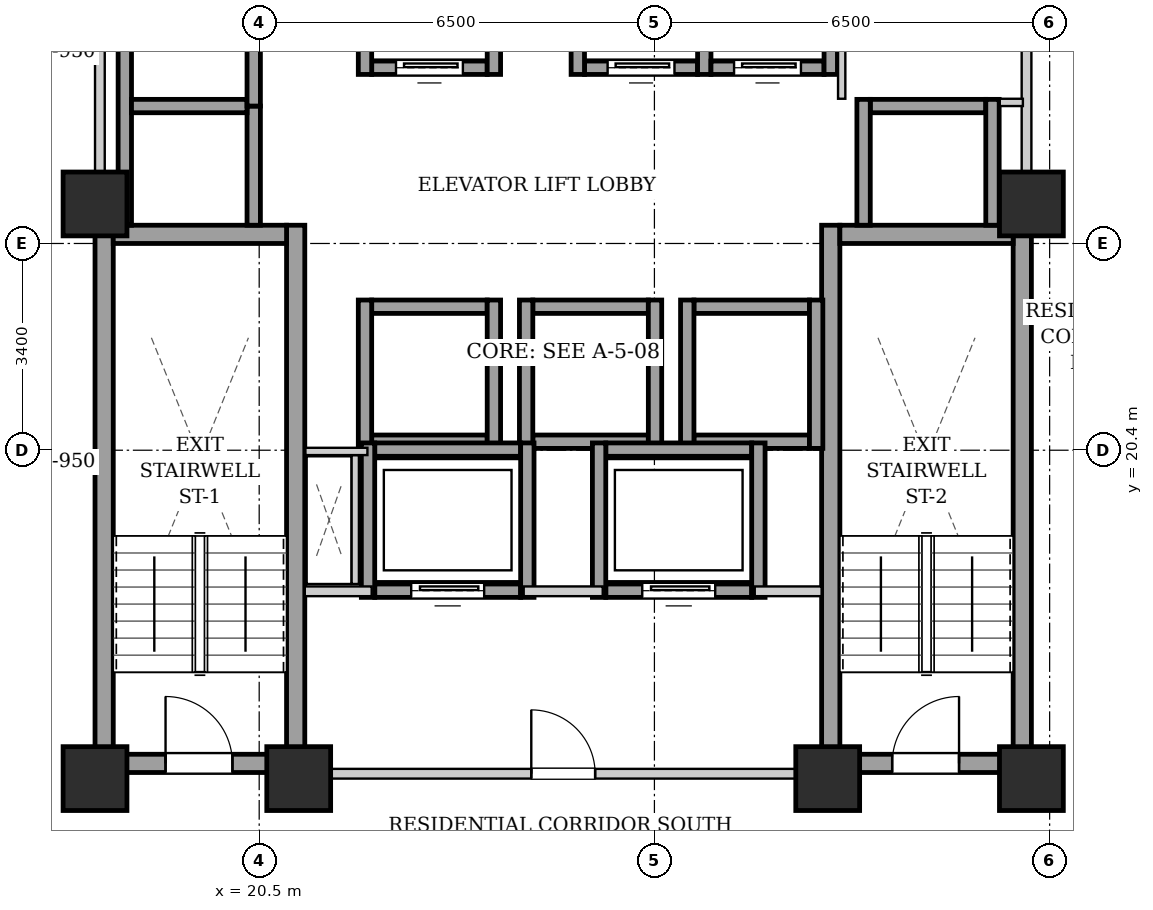
"""IFC4 building model, lengths in metres.
Left out: names, types, materials, properties, quantities, classifications, styles, units other than length and angle.
Written with IfcOpenShell. Run it as: python <this file> out.ifc"""

import sys

from ifc_helpers import new_model, si_unit, direction, frame, frame_2d, origin, origin_2d, place, context, subcontext, project, spatial, rectangle, extrude, element, fill, save


model = new_model("IFC4")
c1 = context("Model", 3, precision=1e-05, world=origin(), true_north=direction((0.0, 1.0)))
c2 = subcontext(c1, "Body", "Model", "MODEL_VIEW")
j1 = project(units=[si_unit("LENGTHUNIT", "METRE"), si_unit("PLANEANGLEUNIT", "RADIAN")], contexts=[c1])
p1 = place(None, origin())
s1 = spatial("IfcSite", under=j1, at=p1, CompositionType="ELEMENT")
p2 = place(p1, origin())
s2 = spatial("IfcBuilding", under=s1, at=p2, CompositionType="ELEMENT")
p3 = place(p2, frame((0.0, 0.0, 100.7)))
s3 = spatial("IfcBuildingStorey", under=s2, at=p3, CompositionType="ELEMENT", Elevation=100.7)
for number, where, z_axis, x_axis in (
    (1, (17.8, 15.0, 0.0), (0.0, 0.0, 1.0), (1.0, 0.0, 0.0)),
    (2, (21.15, 15.0, 0.0), (0.0, 0.0, 1.0), (1.0, 0.0, 0.0)),
    (3, (29.85, 15.0, 0.0), (0.0, 0.0, 1.0), (1.0, 0.0, 0.0)),
    (4, (33.2, 15.0, 0.0), (0.0, 0.0, 1.0), (1.0, 0.0, 0.0)),
    (5, (17.8, 24.45, 0.0), (0.0, 0.0, 1.0), (1.0, 0.0, 0.0)),
    (6, (33.2, 24.45, 0.0), (0.0, 0.0, 1.0), (1.0, 0.0, 0.0)),
):
    element("IfcColumn", number, at=place(p3, frame(where, z_axis=z_axis, x_axis=x_axis)), inside=s3, PredefinedType="COLUMN", context=c2, shape_type="SweptSolid", body=[
        extrude(rectangle(XDim=1.05, YDim=1.05, at=origin_2d()), origin(), (0.0, 0.0, 1.0), 3.2),
    ])
for number, where, z_axis, x_axis in (
    (7, (17.95, 15.1, 0.0), (0.0, 0.0, 1.0), (0.0, 1.0, 0.0)),
    (8, (21.1, 15.1, 0.0), (0.0, 0.0, 1.0), (0.0, 1.0, 0.0)),
):
    element("IfcWall", number, at=place(p3, frame(where, z_axis=z_axis, x_axis=x_axis)), inside=s3, PredefinedType="SHEAR", context=c2, shape_type="SweptSolid", body=[
        extrude(rectangle(XDim=9.0, YDim=0.3, at=frame_2d((4.5, 0.0))), origin(), (0.0, 0.0, 1.0), 2.94),
    ])
p4 = place(p3, frame((18.1, 23.95, 0.0), z_axis=(0.0, 0.0, 1.0), x_axis=(1.0, 0.0, 0.0)))
e9 = element("IfcWall", 9, at=p4, inside=s3, PredefinedType="SHEAR", context=c2, shape_type="SweptSolid", body=[
    extrude(rectangle(XDim=2.85, YDim=0.3, at=frame_2d((1.425, 0.0))), origin(), (0.0, 0.0, 1.0), 2.94),
])
p5 = place(p3, frame((18.1, 15.25, 0.0), z_axis=(0.0, 0.0, 1.0), x_axis=(1.0, 0.0, 0.0)))
e10 = element("IfcWall", 10, at=p5, inside=s3, PredefinedType="SHEAR", context=c2, shape_type="SweptSolid", body=[
    extrude(rectangle(XDim=2.85, YDim=0.3, at=frame_2d((1.425, 0.0))), origin(), (0.0, 0.0, 1.0), 2.94),
])
p6 = place(p5, frame((0.86, 0.0, 0.0)))
e11 = element("IfcOpeningElement", 11, at=p6, cuts=e10, PredefinedType="OPENING", context=c2, shape_type="SweptSolid", body=[
    extrude(rectangle(XDim=1.1, YDim=2.05, at=frame_2d((0.55, 1.025))), frame((0.0, 0.16, 0.0), z_axis=(0.0, -1.0, 0.0), x_axis=(1.0, 0.0, 0.0)), (0.0, 0.0, 1.0), 0.32),
])
for number, where, z_axis, x_axis in (
    (12, (29.9, 15.1, 0.0), (0.0, 0.0, 1.0), (0.0, 1.0, 0.0)),
    (13, (33.05, 15.1, 0.0), (0.0, 0.0, 1.0), (0.0, 1.0, 0.0)),
):
    element("IfcWall", number, at=place(p3, frame(where, z_axis=z_axis, x_axis=x_axis)), inside=s3, PredefinedType="SHEAR", context=c2, shape_type="SweptSolid", body=[
        extrude(rectangle(XDim=9.0, YDim=0.3, at=frame_2d((4.5, 0.0))), origin(), (0.0, 0.0, 1.0), 2.94),
    ])
p7 = place(p3, frame((30.05, 23.95, 0.0), z_axis=(0.0, 0.0, 1.0), x_axis=(1.0, 0.0, 0.0)))
e14 = element("IfcWall", 14, at=p7, inside=s3, PredefinedType="SHEAR", context=c2, shape_type="SweptSolid", body=[
    extrude(rectangle(XDim=2.85, YDim=0.3, at=frame_2d((1.425, 0.0))), origin(), (0.0, 0.0, 1.0), 2.94),
])
p8 = place(p3, frame((30.05, 15.25, 0.0), z_axis=(0.0, 0.0, 1.0), x_axis=(1.0, 0.0, 0.0)))
e15 = element("IfcWall", 15, at=p8, inside=s3, PredefinedType="SHEAR", context=c2, shape_type="SweptSolid", body=[
    extrude(rectangle(XDim=2.85, YDim=0.3, at=frame_2d((1.425, 0.0))), origin(), (0.0, 0.0, 1.0), 2.94),
])
p9 = place(p8, frame((0.86, 0.0, 0.0)))
e16 = element("IfcOpeningElement", 16, at=p9, cuts=e15, PredefinedType="OPENING", context=c2, shape_type="SweptSolid", body=[
    extrude(rectangle(XDim=1.1, YDim=2.05, at=frame_2d((0.55, 1.025))), frame((0.0, 0.16, 0.0), z_axis=(0.0, -1.0, 0.0), x_axis=(1.0, 0.0, 0.0)), (0.0, 0.0, 1.0), 0.32),
])
p10 = place(p3, frame((22.35, 26.69, 0.0), z_axis=(0.0, 0.0, 1.0), x_axis=(1.0, 0.0, 0.0)))
e17 = element("IfcWall", 17, at=p10, inside=s3, PredefinedType="SHEAR", context=c2, shape_type="SweptSolid", body=[
    extrude(rectangle(XDim=1.9, YDim=0.22, at=frame_2d((0.95, 0.0))), origin(), (0.0, 0.0, 1.0), 2.94),
])
p11 = place(p10, frame((0.4, 0.0, 0.0)))
e18 = element("IfcOpeningElement", 18, at=p11, cuts=e17, PredefinedType="OPENING", context=c2, shape_type="SweptSolid", body=[
    extrude(rectangle(XDim=1.1, YDim=2.15, at=frame_2d((0.55, 1.075))), frame((0.0, 0.12, 0.0), z_axis=(0.0, -1.0, 0.0), x_axis=(1.0, 0.0, 0.0)), (0.0, 0.0, 1.0), 0.24),
])
for number, where, z_axis, x_axis in (
    (19, (22.24, 26.58, 0.0), (0.0, 0.0, 1.0), (0.0, 1.0, 0.0)),
    (20, (24.36, 26.58, 0.0), (0.0, 0.0, 1.0), (0.0, 1.0, 0.0)),
):
    element("IfcWall", number, at=place(p3, frame(where, z_axis=z_axis, x_axis=x_axis)), inside=s3, PredefinedType="SHEAR", context=c2, shape_type="SweptSolid", body=[
        extrude(rectangle(XDim=2.44, YDim=0.22, at=frame_2d((1.22, 0.0))), origin(), (0.0, 0.0, 1.0), 2.94),
    ])
p12 = place(p3, frame((25.85, 26.69, 0.0), z_axis=(0.0, 0.0, 1.0), x_axis=(1.0, 0.0, 0.0)))
e21 = element("IfcWall", 21, at=p12, inside=s3, PredefinedType="SHEAR", context=c2, shape_type="SweptSolid", body=[
    extrude(rectangle(XDim=1.86, YDim=0.22, at=frame_2d((0.93, 0.0))), origin(), (0.0, 0.0, 1.0), 2.94),
])
p13 = place(p12, frame((0.38, 0.0, 0.0)))
e22 = element("IfcOpeningElement", 22, at=p13, cuts=e21, PredefinedType="OPENING", context=c2, shape_type="SweptSolid", body=[
    extrude(rectangle(XDim=1.1, YDim=2.15, at=frame_2d((0.55, 1.075))), frame((0.0, 0.12, 0.0), z_axis=(0.0, -1.0, 0.0), x_axis=(1.0, 0.0, 0.0)), (0.0, 0.0, 1.0), 0.24),
])
for number, where, z_axis, x_axis in (
    (23, (25.74, 26.58, 0.0), (0.0, 0.0, 1.0), (0.0, 1.0, 0.0)),
    (24, (27.82, 26.58, 0.0), (0.0, 0.0, 1.0), (0.0, 1.0, 0.0)),
):
    element("IfcWall", number, at=place(p3, frame(where, z_axis=z_axis, x_axis=x_axis)), inside=s3, PredefinedType="SHEAR", context=c2, shape_type="SweptSolid", body=[
        extrude(rectangle(XDim=2.44, YDim=0.22, at=frame_2d((1.22, 0.0))), origin(), (0.0, 0.0, 1.0), 2.94),
    ])
p14 = place(p3, frame((27.93, 26.69, 0.0), z_axis=(0.0, 0.0, 1.0), x_axis=(1.0, 0.0, 0.0)))
e25 = element("IfcWall", 25, at=p14, inside=s3, PredefinedType="SHEAR", context=c2, shape_type="SweptSolid", body=[
    extrude(rectangle(XDim=1.86, YDim=0.22, at=frame_2d((0.93, 0.0))), origin(), (0.0, 0.0, 1.0), 2.94),
])
p15 = place(p14, frame((0.38, 0.0, 0.0)))
e26 = element("IfcOpeningElement", 26, at=p15, cuts=e25, PredefinedType="OPENING", context=c2, shape_type="SweptSolid", body=[
    extrude(rectangle(XDim=1.1, YDim=2.15, at=frame_2d((0.55, 1.075))), frame((0.0, 0.12, 0.0), z_axis=(0.0, -1.0, 0.0), x_axis=(1.0, 0.0, 0.0)), (0.0, 0.0, 1.0), 0.24),
])
p16 = place(p3, frame((29.9, 26.58, 0.0), z_axis=(0.0, 0.0, 1.0), x_axis=(0.0, 1.0, 0.0)))
e27 = element("IfcWall", 27, at=p16, inside=s3, PredefinedType="SHEAR", context=c2, shape_type="SweptSolid", body=[
    extrude(rectangle(XDim=2.44, YDim=0.22, at=frame_2d((1.22, 0.0))), origin(), (0.0, 0.0, 1.0), 2.94),
])
for number, where, z_axis, x_axis in (
    (28, (22.35, 20.54, 0.0), (0.0, 0.0, 1.0), (1.0, 0.0, 0.0)),
    (29, (22.35, 22.76, 0.0), (0.0, 0.0, 1.0), (1.0, 0.0, 0.0)),
):
    element("IfcWall", number, at=place(p3, frame(where, z_axis=z_axis, x_axis=x_axis)), inside=s3, PredefinedType="SHEAR", context=c2, shape_type="SweptSolid", body=[
        extrude(rectangle(XDim=1.9, YDim=0.22, at=frame_2d((0.95, 0.0))), origin(), (0.0, 0.0, 1.0), 2.94),
    ])
for number, where, z_axis, x_axis in (
    (30, (22.24, 20.43, 0.0), (0.0, 0.0, 1.0), (0.0, 1.0, 0.0)),
    (31, (24.36, 20.43, 0.0), (0.0, 0.0, 1.0), (0.0, 1.0, 0.0)),
):
    element("IfcWall", number, at=place(p3, frame(where, z_axis=z_axis, x_axis=x_axis)), inside=s3, PredefinedType="SHEAR", context=c2, shape_type="SweptSolid", body=[
        extrude(rectangle(XDim=2.44, YDim=0.22, at=frame_2d((1.22, 0.0))), origin(), (0.0, 0.0, 1.0), 2.94),
    ])
for number, where, z_axis, x_axis in (
    (32, (25.0, 20.54, 0.0), (0.0, 0.0, 1.0), (1.0, 0.0, 0.0)),
    (33, (25.0, 22.76, 0.0), (0.0, 0.0, 1.0), (1.0, 0.0, 0.0)),
):
    element("IfcWall", number, at=place(p3, frame(where, z_axis=z_axis, x_axis=x_axis)), inside=s3, PredefinedType="SHEAR", context=c2, shape_type="SweptSolid", body=[
        extrude(rectangle(XDim=1.9, YDim=0.22, at=frame_2d((0.95, 0.0))), origin(), (0.0, 0.0, 1.0), 2.94),
    ])
for number, where, z_axis, x_axis in (
    (34, (24.89, 20.43, 0.0), (0.0, 0.0, 1.0), (0.0, 1.0, 0.0)),
    (35, (27.01, 20.43, 0.0), (0.0, 0.0, 1.0), (0.0, 1.0, 0.0)),
):
    element("IfcWall", number, at=place(p3, frame(where, z_axis=z_axis, x_axis=x_axis)), inside=s3, PredefinedType="SHEAR", context=c2, shape_type="SweptSolid", body=[
        extrude(rectangle(XDim=2.44, YDim=0.22, at=frame_2d((1.22, 0.0))), origin(), (0.0, 0.0, 1.0), 2.94),
    ])
for number, where, z_axis, x_axis in (
    (36, (27.65, 20.54, 0.0), (0.0, 0.0, 1.0), (1.0, 0.0, 0.0)),
    (37, (27.65, 22.76, 0.0), (0.0, 0.0, 1.0), (1.0, 0.0, 0.0)),
):
    element("IfcWall", number, at=place(p3, frame(where, z_axis=z_axis, x_axis=x_axis)), inside=s3, PredefinedType="SHEAR", context=c2, shape_type="SweptSolid", body=[
        extrude(rectangle(XDim=1.9, YDim=0.22, at=frame_2d((0.95, 0.0))), origin(), (0.0, 0.0, 1.0), 2.94),
    ])
for number, where, z_axis, x_axis in (
    (38, (27.54, 20.43, 0.0), (0.0, 0.0, 1.0), (0.0, 1.0, 0.0)),
    (39, (29.66, 20.43, 0.0), (0.0, 0.0, 1.0), (0.0, 1.0, 0.0)),
):
    element("IfcWall", number, at=place(p3, frame(where, z_axis=z_axis, x_axis=x_axis)), inside=s3, PredefinedType="SHEAR", context=c2, shape_type="SweptSolid", body=[
        extrude(rectangle(XDim=2.44, YDim=0.22, at=frame_2d((1.22, 0.0))), origin(), (0.0, 0.0, 1.0), 2.94),
    ])
p17 = place(p3, frame((18.29, 24.1, 0.0), z_axis=(0.0, 0.0, 1.0), x_axis=(0.0, 1.0, 0.0)))
e40 = element("IfcWall", 40, at=p17, inside=s3, PredefinedType="SHEAR", context=c2, shape_type="SweptSolid", body=[
    extrude(rectangle(XDim=4.14, YDim=0.22, at=frame_2d((2.07, 0.0))), origin(), (0.0, 0.0, 1.0), 2.94),
])
p18 = place(p3, frame((20.41, 24.1, 0.0), z_axis=(0.0, 0.0, 1.0), x_axis=(0.0, 1.0, 0.0)))
e41 = element("IfcWall", 41, at=p18, inside=s3, PredefinedType="SHEAR", context=c2, shape_type="SweptSolid", body=[
    extrude(rectangle(XDim=1.96, YDim=0.22, at=frame_2d((0.98, 0.0))), origin(), (0.0, 0.0, 1.0), 2.94),
])
p19 = place(p3, frame((18.4, 26.06, 0.0), z_axis=(0.0, 0.0, 1.0), x_axis=(1.0, 0.0, 0.0)))
e42 = element("IfcWall", 42, at=p19, inside=s3, PredefinedType="SHEAR", context=c2, shape_type="SweptSolid", body=[
    extrude(rectangle(XDim=1.9, YDim=0.22, at=frame_2d((0.95, 0.0))), origin(), (0.0, 0.0, 1.0), 2.94),
])
p20 = place(p3, frame((20.41, 26.06, 0.0), z_axis=(0.0, 0.0, 1.0), x_axis=(0.0, 1.0, 0.0)))
e43 = element("IfcWall", 43, at=p20, inside=s3, PredefinedType="SHEAR", context=c2, shape_type="SweptSolid", body=[
    extrude(rectangle(XDim=2.18, YDim=0.22, at=frame_2d((1.09, 0.0))), origin(), (0.0, 0.0, 1.0), 2.94),
])
p21 = place(p3, frame((30.55, 26.06, 0.0), z_axis=(0.0, 0.0, 1.0), x_axis=(1.0, 0.0, 0.0)))
e44 = element("IfcWall", 44, at=p21, inside=s3, PredefinedType="SHEAR", context=c2, shape_type="SweptSolid", body=[
    extrude(rectangle(XDim=1.9, YDim=0.22, at=frame_2d((0.95, 0.0))), origin(), (0.0, 0.0, 1.0), 2.94),
])
for number, where, z_axis, x_axis in (
    (45, (30.44, 24.1, 0.0), (0.0, 0.0, 1.0), (0.0, 1.0, 0.0)),
    (46, (32.56, 24.1, 0.0), (0.0, 0.0, 1.0), (0.0, 1.0, 0.0)),
):
    element("IfcWall", number, at=place(p3, frame(where, z_axis=z_axis, x_axis=x_axis)), inside=s3, PredefinedType="SHEAR", context=c2, shape_type="SweptSolid", body=[
        extrude(rectangle(XDim=2.07, YDim=0.22, at=frame_2d((1.035, 0.0))), origin(), (0.0, 0.0, 1.0), 2.94),
    ])
p22 = place(p3, frame((22.4, 18.09, 0.0), z_axis=(0.0, 0.0, 1.0), x_axis=(1.0, 0.0, 0.0)))
e47 = element("IfcWall", 47, at=p22, inside=s3, PredefinedType="SHEAR", context=c2, shape_type="SweptSolid", body=[
    extrude(rectangle(XDim=2.4, YDim=0.22, at=frame_2d((1.2, 0.0))), origin(), (0.0, 0.0, 1.0), 2.94),
])
p23 = place(p22, frame((0.6, 0.0, 0.0)))
e48 = element("IfcOpeningElement", 48, at=p23, cuts=e47, PredefinedType="OPENING", context=c2, shape_type="SweptSolid", body=[
    extrude(rectangle(XDim=1.2, YDim=2.15, at=frame_2d((0.6, 1.075))), frame((0.0, 0.12, 0.0), z_axis=(0.0, -1.0, 0.0), x_axis=(1.0, 0.0, 0.0)), (0.0, 0.0, 1.0), 0.24),
])
p24 = place(p3, frame((22.4, 20.41, 0.0), z_axis=(0.0, 0.0, 1.0), x_axis=(1.0, 0.0, 0.0)))
e49 = element("IfcWall", 49, at=p24, inside=s3, PredefinedType="SHEAR", context=c2, shape_type="SweptSolid", body=[
    extrude(rectangle(XDim=2.4, YDim=0.22, at=frame_2d((1.2, 0.0))), origin(), (0.0, 0.0, 1.0), 2.94),
])
for number, where, z_axis, x_axis in (
    (50, (22.29, 17.98, 0.0), (0.0, 0.0, 1.0), (0.0, 1.0, 0.0)),
    (51, (24.91, 17.98, 0.0), (0.0, 0.0, 1.0), (0.0, 1.0, 0.0)),
):
    element("IfcWall", number, at=place(p3, frame(where, z_axis=z_axis, x_axis=x_axis)), inside=s3, PredefinedType="SHEAR", context=c2, shape_type="SweptSolid", body=[
        extrude(rectangle(XDim=2.54, YDim=0.22, at=frame_2d((1.27, 0.0))), origin(), (0.0, 0.0, 1.0), 2.94),
    ])
p25 = place(p3, frame((26.2, 18.09, 0.0), z_axis=(0.0, 0.0, 1.0), x_axis=(1.0, 0.0, 0.0)))
e52 = element("IfcWall", 52, at=p25, inside=s3, PredefinedType="SHEAR", context=c2, shape_type="SweptSolid", body=[
    extrude(rectangle(XDim=2.4, YDim=0.22, at=frame_2d((1.2, 0.0))), origin(), (0.0, 0.0, 1.0), 2.94),
])
p26 = place(p25, frame((0.6, 0.0, 0.0)))
e53 = element("IfcOpeningElement", 53, at=p26, cuts=e52, PredefinedType="OPENING", context=c2, shape_type="SweptSolid", body=[
    extrude(rectangle(XDim=1.2, YDim=2.15, at=frame_2d((0.6, 1.075))), frame((0.0, 0.12, 0.0), z_axis=(0.0, -1.0, 0.0), x_axis=(1.0, 0.0, 0.0)), (0.0, 0.0, 1.0), 0.24),
])
p27 = place(p3, frame((26.2, 20.41, 0.0), z_axis=(0.0, 0.0, 1.0), x_axis=(1.0, 0.0, 0.0)))
e54 = element("IfcWall", 54, at=p27, inside=s3, PredefinedType="SHEAR", context=c2, shape_type="SweptSolid", body=[
    extrude(rectangle(XDim=2.4, YDim=0.22, at=frame_2d((1.2, 0.0))), origin(), (0.0, 0.0, 1.0), 2.94),
])
for number, where, z_axis, x_axis in (
    (55, (26.09, 17.98, 0.0), (0.0, 0.0, 1.0), (0.0, 1.0, 0.0)),
    (56, (28.71, 17.98, 0.0), (0.0, 0.0, 1.0), (0.0, 1.0, 0.0)),
):
    element("IfcWall", number, at=place(p3, frame(where, z_axis=z_axis, x_axis=x_axis)), inside=s3, PredefinedType="SHEAR", context=c2, shape_type="SweptSolid", body=[
        extrude(rectangle(XDim=2.54, YDim=0.22, at=frame_2d((1.27, 0.0))), origin(), (0.0, 0.0, 1.0), 2.94),
    ])
p28 = place(p3, frame((21.25, 15.08, 0.0), z_axis=(0.0, 0.0, 1.0), x_axis=(1.0, 0.0, 0.0)))
e57 = element("IfcWall", 57, at=p28, inside=s3, PredefinedType="PARTITIONING", context=c2, shape_type="SweptSolid", body=[
    extrude(rectangle(XDim=8.5, YDim=0.16, at=frame_2d((4.25, 0.0))), origin(), (0.0, 0.0, 1.0), 2.313),
])
p29 = place(p28, frame((3.725, 0.0, 0.0)))
e58 = element("IfcOpeningElement", 58, at=p29, cuts=e57, PredefinedType="OPENING", context=c2, shape_type="SweptSolid", body=[
    extrude(rectangle(XDim=1.05, YDim=2.05, at=frame_2d((0.525, 1.025))), frame((0.0, 0.09, 0.0), z_axis=(0.0, -1.0, 0.0), x_axis=(1.0, 0.0, 0.0)), (0.0, 0.0, 1.0), 0.18),
])
p30 = place(p3, frame((21.25, 18.08, 0.0), z_axis=(0.0, 0.0, 1.0), x_axis=(1.0, 0.0, 0.0)))
e59 = element("IfcWall", 59, at=p30, inside=s3, PredefinedType="PARTITIONING", context=c2, shape_type="SweptSolid", body=[
    extrude(rectangle(XDim=1.1, YDim=0.16, at=frame_2d((0.55, 0.0))), origin(), (0.0, 0.0, 1.0), 2.94),
])
p31 = place(p3, frame((24.85, 18.08, 0.0), z_axis=(0.0, 0.0, 1.0), x_axis=(1.0, 0.0, 0.0)))
e60 = element("IfcWall", 60, at=p31, inside=s3, PredefinedType="PARTITIONING", context=c2, shape_type="SweptSolid", body=[
    extrude(rectangle(XDim=1.3, YDim=0.16, at=frame_2d((0.65, 0.0))), origin(), (0.0, 0.0, 1.0), 2.94),
])
p32 = place(p3, frame((28.65, 18.08, 0.0), z_axis=(0.0, 0.0, 1.0), x_axis=(1.0, 0.0, 0.0)))
e61 = element("IfcWall", 61, at=p32, inside=s3, PredefinedType="PARTITIONING", context=c2, shape_type="SweptSolid", body=[
    extrude(rectangle(XDim=1.1, YDim=0.16, at=frame_2d((0.55, 0.0))), origin(), (0.0, 0.0, 1.0), 2.94),
])
for number, where, z_axis, x_axis in (
    (62, (17.88, 24.12, 0.0), (0.0, 0.0, 1.0), (0.0, 1.0, 0.0)),
    (63, (33.12, 24.12, 0.0), (0.0, 0.0, 1.0), (0.0, 1.0, 0.0)),
):
    element("IfcWall", number, at=place(p3, frame(where, z_axis=z_axis, x_axis=x_axis)), inside=s3, PredefinedType="PARTITIONING", context=c2, shape_type="SweptSolid", body=[
        extrude(rectangle(XDim=4.76, YDim=0.16, at=frame_2d((2.38, 0.0))), origin(), (0.0, 0.0, 1.0), 2.94),
    ])
p33 = place(p3, frame((22.08, 18.2, 0.0), z_axis=(0.0, 0.0, 1.0), x_axis=(0.0, 1.0, 0.0)))
e64 = element("IfcWall", 64, at=p33, inside=s3, PredefinedType="PARTITIONING", context=c2, shape_type="SweptSolid", body=[
    extrude(rectangle(XDim=2.12, YDim=0.12, at=frame_2d((1.06, 0.0))), origin(), (0.0, 0.0, 1.0), 2.94),
])
p34 = place(p3, frame((22.28, 20.38, 0.0), z_axis=(0.0, 0.0, 1.0), x_axis=(-1.0, 0.0, 0.0)))
e65 = element("IfcWall", 65, at=p34, inside=s3, PredefinedType="PARTITIONING", context=c2, shape_type="SweptSolid", body=[
    extrude(rectangle(XDim=1.02, YDim=0.12, at=frame_2d((0.51, 0.0))), origin(), (0.0, 0.0, 1.0), 2.94),
])
p35 = place(p3, frame((30.08, 26.18, 0.0), z_axis=(0.0, 0.0, 1.0), x_axis=(0.0, 1.0, 0.0)))
e66 = element("IfcWall", 66, at=p35, inside=s3, PredefinedType="PARTITIONING", context=c2, shape_type="SweptSolid", body=[
    extrude(rectangle(XDim=2.68, YDim=0.12, at=frame_2d((1.34, 0.0))), origin(), (0.0, 0.0, 1.0), 2.94),
])
p36 = place(p3, frame((32.68, 26.12, 0.0), z_axis=(0.0, 0.0, 1.0), x_axis=(1.0, 0.0, 0.0)))
e67 = element("IfcWall", 67, at=p36, inside=s3, PredefinedType="PARTITIONING", context=c2, shape_type="SweptSolid", body=[
    extrude(rectangle(XDim=0.38, YDim=0.12, at=frame_2d((0.19, 0.0))), origin(), (0.0, 0.0, 1.0), 2.94),
])
p37 = place(p6, origin())
e68 = element("IfcDoor", 68, at=p37, inside=s3, OperationType="SINGLE_SWING_LEFT", PredefinedType="DOOR", context=c2, shape_type="SweptSolid", body=[
    extrude(rectangle(XDim=1.1, YDim=2.05, at=frame_2d((0.55, 1.025))), frame((0.0, 0.025, 0.0), z_axis=(0.0, -1.0, 0.0), x_axis=(1.0, 0.0, 0.0)), (0.0, 0.0, 1.0), 0.05),
])
fill(e11, e68)
p38 = place(p9, origin())
e69 = element("IfcDoor", 69, at=p38, inside=s3, OperationType="SINGLE_SWING_RIGHT", PredefinedType="DOOR", context=c2, shape_type="SweptSolid", body=[
    extrude(rectangle(XDim=1.1, YDim=2.05, at=frame_2d((0.55, 1.025))), frame((0.0, 0.025, 0.0), z_axis=(0.0, -1.0, 0.0), x_axis=(1.0, 0.0, 0.0)), (0.0, 0.0, 1.0), 0.05),
])
fill(e16, e69)
p39 = place(p11, origin())
e70 = element("IfcDoor", 70, at=p39, inside=s3, OperationType="SLIDING_TO_LEFT", PredefinedType="DOOR", context=c2, shape_type="SweptSolid", body=[
    extrude(rectangle(XDim=1.1, YDim=2.15, at=frame_2d((0.55, 1.075))), frame((0.0, 0.025, 0.0), z_axis=(0.0, -1.0, 0.0), x_axis=(1.0, 0.0, 0.0)), (0.0, 0.0, 1.0), 0.05),
])
fill(e18, e70)
p40 = place(p13, origin())
e71 = element("IfcDoor", 71, at=p40, inside=s3, OperationType="SLIDING_TO_LEFT", PredefinedType="DOOR", context=c2, shape_type="SweptSolid", body=[
    extrude(rectangle(XDim=1.1, YDim=2.15, at=frame_2d((0.55, 1.075))), frame((0.0, 0.025, 0.0), z_axis=(0.0, -1.0, 0.0), x_axis=(1.0, 0.0, 0.0)), (0.0, 0.0, 1.0), 0.05),
])
fill(e22, e71)
p41 = place(p15, origin())
e72 = element("IfcDoor", 72, at=p41, inside=s3, OperationType="SLIDING_TO_LEFT", PredefinedType="DOOR", context=c2, shape_type="SweptSolid", body=[
    extrude(rectangle(XDim=1.1, YDim=2.15, at=frame_2d((0.55, 1.075))), frame((0.0, 0.025, 0.0), z_axis=(0.0, -1.0, 0.0), x_axis=(1.0, 0.0, 0.0)), (0.0, 0.0, 1.0), 0.05),
])
fill(e26, e72)
p42 = place(p23, origin())
e73 = element("IfcDoor", 73, at=p42, inside=s3, OperationType="SLIDING_TO_LEFT", PredefinedType="DOOR", context=c2, shape_type="SweptSolid", body=[
    extrude(rectangle(XDim=1.2, YDim=2.15, at=frame_2d((0.6, 1.075))), frame((0.0, 0.025, 0.0), z_axis=(0.0, -1.0, 0.0), x_axis=(1.0, 0.0, 0.0)), (0.0, 0.0, 1.0), 0.05),
])
fill(e48, e73)
p43 = place(p26, origin())
e74 = element("IfcDoor", 74, at=p43, inside=s3, OperationType="SLIDING_TO_LEFT", PredefinedType="DOOR", context=c2, shape_type="SweptSolid", body=[
    extrude(rectangle(XDim=1.2, YDim=2.15, at=frame_2d((0.6, 1.075))), frame((0.0, 0.025, 0.0), z_axis=(0.0, -1.0, 0.0), x_axis=(1.0, 0.0, 0.0)), (0.0, 0.0, 1.0), 0.05),
])
fill(e53, e74)
p44 = place(p29, origin())
e75 = element("IfcDoor", 75, at=p44, inside=s3, OperationType="SINGLE_SWING_LEFT", PredefinedType="DOOR", context=c2, shape_type="SweptSolid", body=[
    extrude(rectangle(XDim=1.05, YDim=2.05, at=frame_2d((0.525, 1.025))), frame((0.0, 0.025, 0.0), z_axis=(0.0, -1.0, 0.0), x_axis=(1.0, 0.0, 0.0)), (0.0, 0.0, 1.0), 0.05),
])
fill(e58, e75)
save(model, sys.argv[1])
